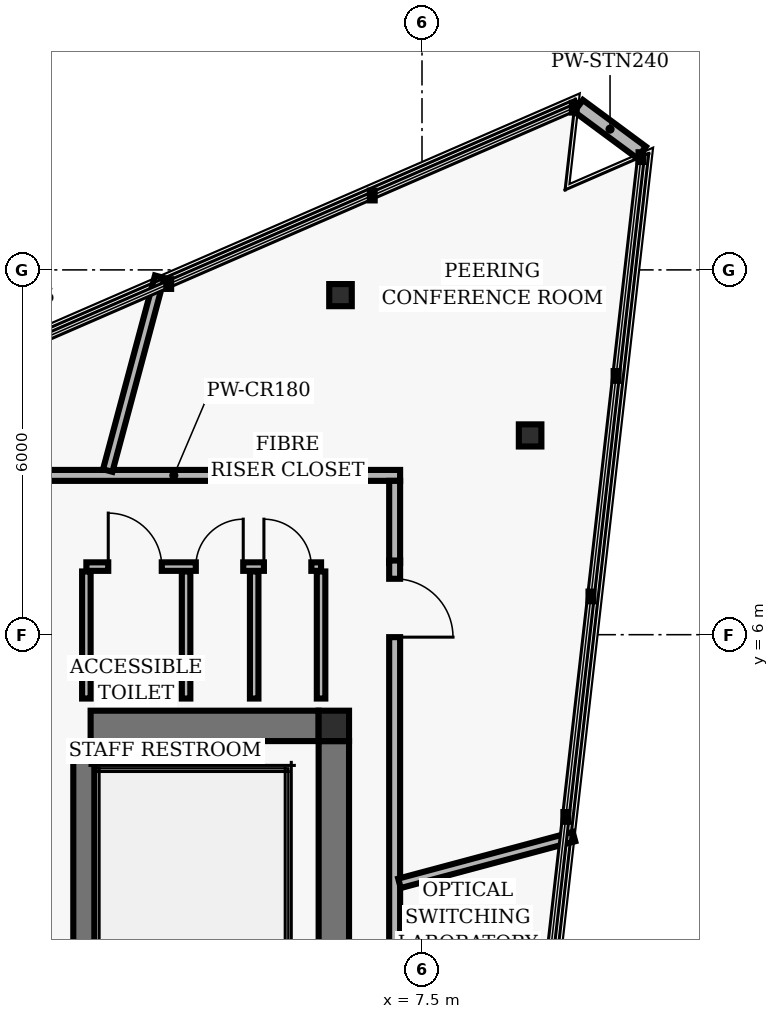
"""IFC4 building model, lengths in metres.
Left out: names, types, materials, properties, quantities, classifications, styles, units other than length and angle.
Written with IfcOpenShell. Run it as: python <this file> out.ifc"""

import sys

from ifc_helpers import new_model, si_unit, direction, frame, frame_2d, origin, origin_2d, place, context, subcontext, project, spatial, rectangle, hollow_rectangle, i_section, extrude, element, fill, save


model = new_model("IFC4")
c1 = context("Model", 3, precision=1e-05, world=origin(), true_north=direction((0.0, 1.0)))
c2 = subcontext(c1, "Body", "Model", "MODEL_VIEW")
j1 = project(units=[si_unit("LENGTHUNIT", "METRE"), si_unit("PLANEANGLEUNIT", "RADIAN")], contexts=[c1])
p1 = place(None, origin())
s1 = spatial("IfcSite", under=j1, at=p1, CompositionType="ELEMENT")
p2 = place(p1, origin())
s2 = spatial("IfcBuilding", under=s1, at=p2, CompositionType="ELEMENT")
p3 = place(p2, frame((0.0, 0.0, 243.36)))
s3 = spatial("IfcBuildingStorey", under=s2, at=p3, CompositionType="ELEMENT", Elevation=243.36)
p4 = place(p3, frame((6.05, 4.5, 0.0), z_axis=(0.0, 0.0, 1.0), x_axis=(1.0, 0.0, 0.0)))
e1 = element("IfcColumn", 1, at=p4, inside=s3, PredefinedType="COLUMN", context=c2, shape_type="SweptSolid", body=[
    extrude(hollow_rectangle(XDim=0.5, YDim=0.5, WallThickness=0.02, InnerFilletRadius=0.02, OuterFilletRadius=0.04, at=origin_2d()), origin(), (0.0, 0.0, 1.0), 2.88),
])
p5 = place(p3, frame((6.05, 0.25, 0.0), z_axis=(0.0, 0.0, 1.0), x_axis=(0.0, 1.0, 0.0)))
e2 = element("IfcWall", 2, at=p5, inside=s3, PredefinedType="SHEAR", context=c2, shape_type="SweptSolid", body=[
    extrude(rectangle(XDim=4.0, YDim=0.5, at=frame_2d((2.0, 0.0))), origin(), (0.0, 0.0, 1.0), 2.648),
])
p6 = place(p3, frame((1.94, -4.1, 0.0), z_axis=(0.0, 0.0, 1.0), x_axis=(0.0, 1.0, 0.0)))
e3 = element("IfcWall", 3, at=p6, inside=s3, PredefinedType="SHEAR", context=c2, shape_type="SweptSolid", body=[
    extrude(rectangle(XDim=8.2, YDim=0.35, at=frame_2d((4.1, 0.0))), origin(), (0.0, 0.0, 1.0), 2.648),
])
p7 = place(p3, frame((2.05, 4.5, 0.0), z_axis=(0.0, 0.0, 1.0), x_axis=(1.0, 0.0, 0.0)))
e4 = element("IfcWall", 4, at=p7, inside=s3, PredefinedType="SHEAR", context=c2, shape_type="SweptSolid", body=[
    extrude(rectangle(XDim=3.75, YDim=0.5, at=frame_2d((1.875, 0.0))), origin(), (0.0, 0.0, 1.0), 2.648),
])
for number, where, z_axis, x_axis in (
    (5, (9.278, 9.277, 0.0), (0.0, 0.0, 1.0), (1.0, 0.0, 0.0)),
    (6, (6.159, 11.585, 0.0), (0.0, 0.0, 1.0), (1.0, 0.0, 0.0)),
):
    element("IfcColumn", number, at=place(p3, frame(where, z_axis=z_axis, x_axis=x_axis)), inside=s3, PredefinedType="COLUMN", context=c2, shape_type="SweptSolid", body=[
        extrude(i_section(OverallWidth=0.371, OverallDepth=0.364, WebThickness=0.013, FlangeThickness=0.022, FilletRadius=0.015, at=origin_2d()), origin(), (0.0, 0.0, 1.0), 2.88),
    ])
p8 = place(p3, frame((11.11, 13.932, 0.0), z_axis=(0.0, 0.0, 1.0), x_axis=(-0.803939758325, 0.5947107406, 0.0)))
e7 = element("IfcWall", 7, at=p8, inside=s3, PredefinedType="PARAPET", context=c2, shape_type="SweptSolid", body=[
    extrude(rectangle(XDim=1.288, YDim=0.24, at=frame_2d((0.644, 0.0))), origin(), (0.0, 0.0, 1.0), 2.168),
])
p9 = place(p3, frame((1.98, 4.95, 0.0), z_axis=(0.0, 0.0, 1.0), x_axis=(0.0, 1.0, 0.0)))
e8 = element("IfcWall", 8, at=p9, inside=s3, PredefinedType="PARTITIONING", context=c2, shape_type="SweptSolid", body=[
    extrude(rectangle(XDim=2.09, YDim=0.14, at=frame_2d((1.045, 0.0))), origin(), (0.0, 0.0, 1.0), 2.623),
])
p10 = place(p3, frame((5.84, 4.95, 0.0), z_axis=(0.0, 0.0, 1.0), x_axis=(0.0, 1.0, 0.0)))
e9 = element("IfcWall", 9, at=p10, inside=s3, PredefinedType="PARTITIONING", context=c2, shape_type="SweptSolid", body=[
    extrude(rectangle(XDim=2.09, YDim=0.14, at=frame_2d((1.045, 0.0))), origin(), (0.0, 0.0, 1.0), 2.153),
])
p11 = place(p3, frame((1.98, 7.12, 0.0), z_axis=(0.0, 0.0, 1.0), x_axis=(1.0, 0.0, 0.0)))
e10 = element("IfcWall", 10, at=p11, inside=s3, PredefinedType="PARTITIONING", context=c2, shape_type="SweptSolid", body=[
    extrude(rectangle(XDim=3.86, YDim=0.14, at=frame_2d((1.93, 0.0))), origin(), (0.0, 0.0, 1.0), 2.623),
])
p12 = place(p11, frame((0.36, 0.0, 0.0)))
e11 = element("IfcOpeningElement", 11, at=p12, cuts=e10, PredefinedType="OPENING", context=c2, shape_type="SweptSolid", body=[
    extrude(rectangle(XDim=0.88, YDim=2.02, at=frame_2d((0.44, 1.01))), frame((0.0, 0.08, 0.0), z_axis=(0.0, -1.0, 0.0), x_axis=(1.0, 0.0, 0.0)), (0.0, 0.0, 1.0), 0.16),
])
p13 = place(p11, frame((1.8, 0.0, 0.0)))
e12 = element("IfcOpeningElement", 12, at=p13, cuts=e10, PredefinedType="OPENING", context=c2, shape_type="SweptSolid", body=[
    extrude(rectangle(XDim=0.78, YDim=2.01, at=frame_2d((0.39, 1.005))), frame((0.0, 0.08, 0.0), z_axis=(0.0, -1.0, 0.0), x_axis=(1.0, 0.0, 0.0)), (0.0, 0.0, 1.0), 0.16),
])
p14 = place(p11, frame((2.92, 0.0, 0.0)))
e13 = element("IfcOpeningElement", 13, at=p14, cuts=e10, PredefinedType="OPENING", context=c2, shape_type="SweptSolid", body=[
    extrude(rectangle(XDim=0.78, YDim=2.01, at=frame_2d((0.39, 1.005))), frame((0.0, 0.08, 0.0), z_axis=(0.0, -1.0, 0.0), x_axis=(1.0, 0.0, 0.0)), (0.0, 0.0, 1.0), 0.16),
])
for number, where, z_axis, x_axis in (
    (14, (3.62, 4.95, 0.0), (0.0, 0.0, 1.0), (0.0, 1.0, 0.0)),
    (15, (4.74, 4.95, 0.0), (0.0, 0.0, 1.0), (0.0, 1.0, 0.0)),
):
    element("IfcWall", number, at=place(p3, frame(where, z_axis=z_axis, x_axis=x_axis)), inside=s3, PredefinedType="PARTITIONING", context=c2, shape_type="SweptSolid", body=[
        extrude(rectangle(XDim=2.09, YDim=0.14, at=frame_2d((1.045, 0.0))), origin(), (0.0, 0.0, 1.0), 2.623),
    ])
p15 = place(p3, frame((-1.617, 8.62, 0.0), z_axis=(0.0, 0.0, 1.0), x_axis=(1.0, 0.0, 0.0)))
e16 = element("IfcWall", 16, at=p15, inside=s3, PredefinedType="PARTITIONING", context=c2, shape_type="SweptSolid", body=[
    extrude(rectangle(XDim=7.487, YDim=0.18, at=frame_2d((3.743, 0.0))), origin(), (0.0, 0.0, 1.0), 2.623),
])
p16 = place(p15, frame((1.623, 0.0, 0.0)))
e17 = element("IfcOpeningElement", 17, at=p16, cuts=e16, PredefinedType="OPENING", context=c2, shape_type="SweptSolid", body=[
    extrude(rectangle(XDim=0.96, YDim=2.02, at=frame_2d((0.48, 1.01))), frame((0.0, 0.1, 0.0), z_axis=(0.0, -1.0, 0.0), x_axis=(1.0, 0.0, 0.0)), (0.0, 0.0, 1.0), 0.2),
])
p17 = place(p3, frame((5.83, 8.62, 0.0), z_axis=(0.0, 0.0, 1.0), x_axis=(1.0, 0.0, 0.0)))
e18 = element("IfcWall", 18, at=p17, inside=s3, PredefinedType="PARTITIONING", context=c2, shape_type="SweptSolid", body=[
    extrude(rectangle(XDim=1.31, YDim=0.18, at=frame_2d((0.655, 0.0))), origin(), (0.0, 0.0, 1.0), 2.623),
])
p18 = place(p3, frame((7.05, 8.53, 0.0), z_axis=(0.0, 0.0, 1.0), x_axis=(0.0, -1.0, 0.0)))
e19 = element("IfcWall", 19, at=p18, inside=s3, PredefinedType="PARTITIONING", context=c2, shape_type="SweptSolid", body=[
    extrude(rectangle(XDim=1.35, YDim=0.18, at=frame_2d((0.675, 0.0))), origin(), (0.0, 0.0, 1.0), 2.623),
])
p19 = place(p3, frame((7.05, 7.22, 0.0), z_axis=(0.0, 0.0, 1.0), x_axis=(0.0, -1.0, 0.0)))
e20 = element("IfcWall", 20, at=p19, inside=s3, PredefinedType="PARTITIONING", context=c2, shape_type="SweptSolid", body=[
    extrude(rectangle(XDim=14.48, YDim=0.18, at=frame_2d((7.24, 0.0))), origin(), (0.0, 0.0, 1.0), 2.203),
])
p20 = place(p19, frame((12.019, 0.0, 0.0)))
e21 = element("IfcOpeningElement", 21, at=p20, cuts=e20, PredefinedType="OPENING", context=c2, shape_type="SweptSolid", body=[
    extrude(rectangle(XDim=1.02, YDim=2.02, at=frame_2d((0.51, 1.01))), frame((0.0, 0.1, 0.0), z_axis=(0.0, -1.0, 0.0), x_axis=(1.0, 0.0, 0.0)), (0.0, 0.0, 1.0), 0.2),
])
p21 = place(p19, frame((0.3, 0.0, 0.0)))
e22 = element("IfcOpeningElement", 22, at=p21, cuts=e20, PredefinedType="OPENING", context=c2, shape_type="SweptSolid", body=[
    extrude(rectangle(XDim=0.96, YDim=2.02, at=frame_2d((0.48, 1.01))), frame((0.0, 0.1, 0.0), z_axis=(0.0, -1.0, 0.0), x_axis=(1.0, 0.0, 0.0)), (0.0, 0.0, 1.0), 0.2),
])
p22 = place(p3, frame((7.13, 1.91, 0.0), z_axis=(0.0, 0.0, 1.0), x_axis=(0.965935580448, 0.258782639342, 0.0)))
e23 = element("IfcWall", 23, at=p22, inside=s3, PredefinedType="PARTITIONING", context=c2, shape_type="SweptSolid", body=[
    extrude(rectangle(XDim=2.971, YDim=0.16, at=frame_2d((1.485, 0.0))), origin(), (0.0, 0.0, 1.0), 2.623),
])
p23 = place(p3, frame((2.331, 8.7, 0.0), z_axis=(0.0, 0.0, 1.0), x_axis=(0.258776761059, 0.965937155273, 0.0)))
e24 = element("IfcWall", 24, at=p23, inside=s3, PredefinedType="PARTITIONING", context=c2, shape_type="SweptSolid", body=[
    extrude(rectangle(XDim=3.3, YDim=0.16, at=frame_2d((1.65, 0.0))), origin(), (0.0, 0.0, 1.0), 2.623),
])
p24 = place(p12, origin())
e25 = element("IfcDoor", 25, at=p24, inside=s3, OperationType="SINGLE_SWING_LEFT", PredefinedType="DOOR", context=c2, shape_type="SweptSolid", body=[
    extrude(rectangle(XDim=0.88, YDim=2.02, at=frame_2d((0.44, 1.01))), frame((0.0, 0.025, 0.0), z_axis=(0.0, -1.0, 0.0), x_axis=(1.0, 0.0, 0.0)), (0.0, 0.0, 1.0), 0.05),
])
fill(e11, e25)
p25 = place(p13, origin())
e26 = element("IfcDoor", 26, at=p25, inside=s3, OperationType="SINGLE_SWING_RIGHT", PredefinedType="DOOR", context=c2, shape_type="SweptSolid", body=[
    extrude(rectangle(XDim=0.78, YDim=2.01, at=frame_2d((0.39, 1.005))), frame((0.0, 0.025, 0.0), z_axis=(0.0, -1.0, 0.0), x_axis=(1.0, 0.0, 0.0)), (0.0, 0.0, 1.0), 0.05),
])
fill(e12, e26)
p26 = place(p14, origin())
e27 = element("IfcDoor", 27, at=p26, inside=s3, OperationType="SINGLE_SWING_LEFT", PredefinedType="DOOR", context=c2, shape_type="SweptSolid", body=[
    extrude(rectangle(XDim=0.78, YDim=2.01, at=frame_2d((0.39, 1.005))), frame((0.0, 0.025, 0.0), z_axis=(0.0, -1.0, 0.0), x_axis=(1.0, 0.0, 0.0)), (0.0, 0.0, 1.0), 0.05),
])
fill(e13, e27)
p27 = place(p21, origin())
e28 = element("IfcDoor", 28, at=p27, inside=s3, OperationType="SINGLE_SWING_RIGHT", PredefinedType="DOOR", context=c2, shape_type="SweptSolid", body=[
    extrude(rectangle(XDim=0.96, YDim=2.02, at=frame_2d((0.48, 1.01))), frame((0.0, 0.025, 0.0), z_axis=(0.0, -1.0, 0.0), x_axis=(1.0, 0.0, 0.0)), (0.0, 0.0, 1.0), 0.05),
])
fill(e22, e28)
save(model, sys.argv[1])
